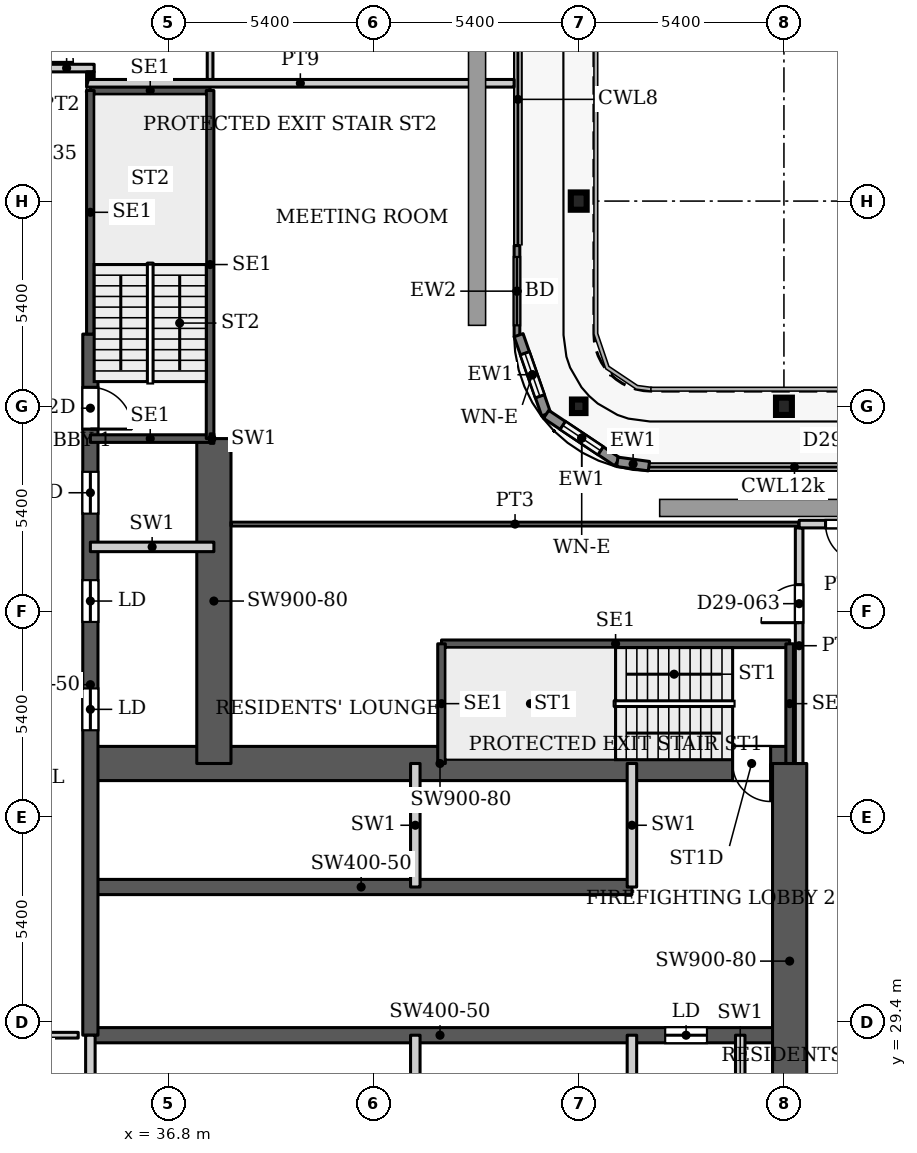
"""IFC4 building model, lengths in metres.
Left out: names, types, materials, properties, quantities, classifications, styles, units other than length and angle.
Written with IfcOpenShell. Run it as: python <this file> out.ifc"""

import sys

from ifc_helpers import new_model, si_unit, direction, frame, frame_2d, origin, origin_2d, place, context, subcontext, project, spatial, rectangle, hollow_rectangle, i_section, extrude, source, transform, mapped, element, fill, save


model = new_model("IFC4")
c1 = context("Model", 3, precision=1e-05, world=origin(), true_north=direction((0.0, 1.0)))
c2 = subcontext(c1, "Body", "Model", "MODEL_VIEW")
j1 = project(units=[si_unit("LENGTHUNIT", "METRE"), si_unit("PLANEANGLEUNIT", "RADIAN")], contexts=[c1])
p1 = place(None, origin())
s1 = spatial("IfcSite", under=j1, at=p1, CompositionType="ELEMENT")
p2 = place(p1, origin())
s2 = spatial("IfcBuilding", under=s1, at=p2, CompositionType="ELEMENT")
p3 = place(p2, frame((0.0, 0.0, 129.2)))
s3 = spatial("IfcBuildingStorey", under=s2, at=p3, CompositionType="ELEMENT", Elevation=129.2)
for number, where, z_axis, x_axis in (
    (1, (53.0, 45.6, 0.0), (0.0, 0.0, 1.0), (1.0, 0.0, 0.0)),
    (2, (47.6, 51.0, 0.0), (0.0, 0.0, 1.0), (1.0, 0.0, 0.0)),
):
    element("IfcColumn", number, at=place(p3, frame(where, z_axis=z_axis, x_axis=x_axis)), inside=s3, PredefinedType="COLUMN", context=c2, shape_type="SweptSolid", body=[
        extrude(i_section(OverallWidth=0.418, OverallDepth=0.455, WebThickness=0.042, FlangeThickness=0.068, FilletRadius=0.014, at=origin_2d()), origin(), (0.0, 0.0, 1.0), 3.9),
    ])
p4 = place(p3, frame((47.6, 45.6, 0.0), z_axis=(0.0, 0.0, 1.0), x_axis=(1.0, 0.0, 0.0)))
e3 = element("IfcColumn", 3, at=p4, inside=s3, PredefinedType="COLUMN", context=c2, shape_type="SweptSolid", body=[
    extrude(hollow_rectangle(XDim=0.356, YDim=0.356, WallThickness=0.016, InnerFilletRadius=0.016, OuterFilletRadius=0.032, at=origin_2d()), origin(), (0.0, 0.0, 1.0), 3.9),
])
p5 = place(p3, frame((34.75, 29.05, 0.0), z_axis=(0.0, 0.0, 1.0), x_axis=(1.0, 0.0, 0.0)))
e4 = element("IfcWall", 4, at=p5, inside=s3, PredefinedType="SHEAR", context=c2, shape_type="SweptSolid", body=[
    extrude(rectangle(XDim=18.4, YDim=0.4, at=frame_2d((9.2, 0.0))), origin(), (0.0, 0.0, 1.0), 3.9),
])
p6 = place(p5, frame((15.125, 0.0, 0.0)))
e5 = element("IfcOpeningElement", 5, at=p6, cuts=e4, PredefinedType="OPENING", context=c2, shape_type="SweptSolid", body=[
    extrude(rectangle(XDim=1.1, YDim=2.2, at=frame_2d((0.55, 1.1))), frame((0.0, 0.21, 0.0), z_axis=(0.0, -1.0, 0.0), x_axis=(1.0, 0.0, 0.0)), (0.0, 0.0, 1.0), 0.42),
])
p7 = place(p3, frame((34.75, 32.95, 0.0), z_axis=(0.0, 0.0, 1.0), x_axis=(1.0, 0.0, 0.0)))
e6 = element("IfcWall", 6, at=p7, inside=s3, PredefinedType="SHEAR", context=c2, shape_type="SweptSolid", body=[
    extrude(rectangle(XDim=14.25, YDim=0.4, at=frame_2d((7.125, 0.0))), origin(), (0.0, 0.0, 1.0), 3.9),
])
p8 = place(p3, frame((34.75, 36.2, 0.0), z_axis=(0.0, 0.0, 1.0), x_axis=(1.0, 0.0, 0.0)))
e7 = element("IfcWall", 7, at=p8, inside=s3, PredefinedType="SHEAR", context=c2, shape_type="SweptSolid", body=[
    extrude(rectangle(XDim=18.4, YDim=0.9, at=frame_2d((9.2, 0.0))), origin(), (0.0, 0.0, 1.0), 3.9),
])
p9 = place(p8, frame((16.9, 0.0, 0.0)))
e8 = element("IfcOpeningElement", 8, at=p9, cuts=e7, PredefinedType="OPENING", context=c2, shape_type="SweptSolid", body=[
    extrude(rectangle(XDim=1.0, YDim=2.2, at=frame_2d((0.5, 1.1))), frame((0.0, 0.46, 0.0), z_axis=(0.0, -1.0, 0.0), x_axis=(1.0, 0.0, 0.0)), (0.0, 0.0, 1.0), 0.92),
])
p10 = place(p3, frame((34.75, 29.05, 0.0), z_axis=(0.0, 0.0, 1.0), x_axis=(0.0, 1.0, 0.0)))
e9 = element("IfcWall", 9, at=p10, inside=s3, PredefinedType="SHEAR", context=c2, shape_type="SweptSolid", body=[
    extrude(rectangle(XDim=18.45, YDim=0.4, at=frame_2d((9.225, 0.0))), origin(), (0.0, 0.0, 1.0), 3.9),
])
p11 = place(p10, frame((8.025, 0.0, 0.0)))
e10 = element("IfcOpeningElement", 10, at=p11, cuts=e9, PredefinedType="OPENING", context=c2, shape_type="SweptSolid", body=[
    extrude(rectangle(XDim=1.1, YDim=2.2, at=frame_2d((0.55, 1.1))), frame((0.0, 0.21, 0.0), z_axis=(0.0, -1.0, 0.0), x_axis=(1.0, 0.0, 0.0)), (0.0, 0.0, 1.0), 0.42),
])
p12 = place(p10, frame((10.875, 0.0, 0.0)))
e11 = element("IfcOpeningElement", 11, at=p12, cuts=e9, PredefinedType="OPENING", context=c2, shape_type="SweptSolid", body=[
    extrude(rectangle(XDim=1.1, YDim=2.2, at=frame_2d((0.55, 1.1))), frame((0.0, 0.21, 0.0), z_axis=(0.0, -1.0, 0.0), x_axis=(1.0, 0.0, 0.0)), (0.0, 0.0, 1.0), 0.42),
])
p13 = place(p10, frame((13.725, 0.0, 0.0)))
e12 = element("IfcOpeningElement", 12, at=p13, cuts=e9, PredefinedType="OPENING", context=c2, shape_type="SweptSolid", body=[
    extrude(rectangle(XDim=1.1, YDim=2.2, at=frame_2d((0.55, 1.1))), frame((0.0, 0.21, 0.0), z_axis=(0.0, -1.0, 0.0), x_axis=(1.0, 0.0, 0.0)), (0.0, 0.0, 1.0), 0.42),
])
p14 = place(p10, frame((15.95, 0.0, 0.0)))
e13 = element("IfcOpeningElement", 13, at=p14, cuts=e9, PredefinedType="OPENING", context=c2, shape_type="SweptSolid", body=[
    extrude(rectangle(XDim=1.1, YDim=2.2, at=frame_2d((0.55, 1.1))), frame((0.0, 0.21, 0.0), z_axis=(0.0, -1.0, 0.0), x_axis=(1.0, 0.0, 0.0)), (0.0, 0.0, 1.0), 0.42),
])
p15 = place(p3, frame((38.0, 36.2, 0.0), z_axis=(0.0, 0.0, 1.0), x_axis=(0.0, 1.0, 0.0)))
e14 = element("IfcWall", 14, at=p15, inside=s3, PredefinedType="SHEAR", context=c2, shape_type="SweptSolid", body=[
    extrude(rectangle(XDim=8.55, YDim=0.9, at=frame_2d((4.275, 0.0))), origin(), (0.0, 0.0, 1.0), 3.9),
])
p16 = place(p3, frame((53.15, 25.8, 0.0), z_axis=(0.0, 0.0, 1.0), x_axis=(0.0, 1.0, 0.0)))
e15 = element("IfcWall", 15, at=p16, inside=s3, PredefinedType="SHEAR", context=c2, shape_type="SweptSolid", body=[
    extrude(rectangle(XDim=10.4, YDim=0.9, at=frame_2d((5.2, 0.0))), origin(), (0.0, 0.0, 1.0), 3.9),
])
p17 = place(p3, frame((45.975, 49.83, 0.0), z_axis=(0.0, 0.0, 1.0), x_axis=(0.0, -1.0, 0.0)))
e16 = element("IfcWall", 16, at=p17, inside=s3, PredefinedType="SOLIDWALL", context=c2, shape_type="SweptSolid", body=[
    extrude(rectangle(XDim=2.4, YDim=0.15, at=frame_2d((1.2, 0.0))), origin(), (0.0, 0.0, 1.0), 3.75),
])
p18 = place(p17, frame((0.3, 0.0, 0.0)))
e17 = element("IfcOpeningElement", 17, at=p18, cuts=e16, PredefinedType="OPENING", context=c2, shape_type="SweptSolid", body=[
    extrude(rectangle(XDim=1.8, YDim=2.4, at=frame_2d((0.9, 1.2))), frame((0.0, 0.085, 0.0), z_axis=(0.0, -1.0, 0.0), x_axis=(1.0, 0.0, 0.0)), (0.0, 0.0, 1.0), 0.17),
])
p19 = place(p3, frame((46.018, 47.471, 0.0), z_axis=(0.0, 0.0, 1.0), x_axis=(0.328791208903, -0.944402637093, 0.0)))
e18 = element("IfcWall", 18, at=p19, inside=s3, PredefinedType="SOLIDWALL", context=c2, shape_type="SweptSolid", body=[
    extrude(rectangle(XDim=2.205, YDim=0.25, at=frame_2d((1.102, 0.0))), origin(), (0.0, 0.0, 1.0), 3.75),
])
p20 = place(p19, frame((0.503, 0.0, 0.6)))
e19 = element("IfcOpeningElement", 19, at=p20, cuts=e18, PredefinedType="OPENING", context=c2, shape_type="SweptSolid", body=[
    extrude(rectangle(XDim=1.2, YDim=2.1, at=frame_2d((0.6, 1.05))), frame((0.0, 0.135, 0.0), z_axis=(0.0, -1.0, 0.0), x_axis=(1.0, 0.0, 0.0)), (0.0, 0.0, 1.0), 0.27),
])
p21 = place(p3, frame((46.743, 45.389, 0.0), z_axis=(0.0, 0.0, 1.0), x_axis=(0.831449265529, -0.555600682912, 0.0)))
e20 = element("IfcWall", 20, at=p21, inside=s3, PredefinedType="SOLIDWALL", context=c2, shape_type="SweptSolid", body=[
    extrude(rectangle(XDim=2.251, YDim=0.25, at=frame_2d((1.126, 0.0))), origin(), (0.0, 0.0, 1.0), 3.75),
])
p22 = place(p21, frame((0.525, 0.0, 0.6)))
e21 = element("IfcOpeningElement", 21, at=p22, cuts=e20, PredefinedType="OPENING", context=c2, shape_type="SweptSolid", body=[
    extrude(rectangle(XDim=1.2, YDim=2.1, at=frame_2d((0.6, 1.05))), frame((0.0, 0.135, 0.0), z_axis=(0.0, -1.0, 0.0), x_axis=(1.0, 0.0, 0.0)), (0.0, 0.0, 1.0), 0.27),
])
p23 = place(p3, frame((48.615, 44.138, 0.0), z_axis=(0.0, 0.0, 1.0), x_axis=(0.990741504246, -0.135761819977, 0.0)))
e22 = element("IfcWall", 22, at=p23, inside=s3, PredefinedType="SOLIDWALL", context=c2, shape_type="SweptSolid", body=[
    extrude(rectangle(XDim=0.84, YDim=0.25, at=frame_2d((0.42, 0.0))), origin(), (0.0, 0.0, 1.0), 3.75),
])
p24 = place(p3, frame((43.99, 39.35, 0.0), z_axis=(0.0, 0.0, 1.0), x_axis=(1.0, 0.0, 0.0)))
e23 = element("IfcWall", 23, at=p24, inside=s3, PredefinedType="SHEAR", context=c2, shape_type="SweptSolid", body=[
    extrude(rectangle(XDim=9.16, YDim=0.2, at=frame_2d((4.58, 0.0))), origin(), (0.0, 0.0, 1.0), 3.9),
])
for number, where, z_axis, x_axis in (
    (24, (43.99, 36.2, 0.0), (0.0, 0.0, 1.0), (0.0, 1.0, 0.0)),
    (25, (53.15, 36.2, 0.0), (0.0, 0.0, 1.0), (0.0, 1.0, 0.0)),
):
    element("IfcWall", number, at=place(p3, frame(where, z_axis=z_axis, x_axis=x_axis)), inside=s3, PredefinedType="SHEAR", context=c2, shape_type="SweptSolid", body=[
        extrude(rectangle(XDim=3.15, YDim=0.2, at=frame_2d((1.575, 0.0))), origin(), (0.0, 0.0, 1.0), 3.9),
    ])
for number, where, z_axis, x_axis in (
    (26, (34.75, 44.75, 0.0), (0.0, 0.0, 1.0), (1.0, 0.0, 0.0)),
    (27, (34.75, 53.91, 0.0), (0.0, 0.0, 1.0), (1.0, 0.0, 0.0)),
):
    element("IfcWall", number, at=place(p3, frame(where, z_axis=z_axis, x_axis=x_axis)), inside=s3, PredefinedType="SHEAR", context=c2, shape_type="SweptSolid", body=[
        extrude(rectangle(XDim=3.15, YDim=0.2, at=frame_2d((1.575, 0.0))), origin(), (0.0, 0.0, 1.0), 3.9),
    ])
p25 = place(p3, frame((34.75, 47.5, 0.0), z_axis=(0.0, 0.0, 1.0), x_axis=(0.0, 1.0, 0.0)))
e28 = element("IfcWall", 28, at=p25, inside=s3, PredefinedType="SHEAR", context=c2, shape_type="SweptSolid", body=[
    extrude(rectangle(XDim=6.41, YDim=0.2, at=frame_2d((3.205, 0.0))), origin(), (0.0, 0.0, 1.0), 3.9),
])
p26 = place(p3, frame((37.9, 44.75, 0.0), z_axis=(0.0, 0.0, 1.0), x_axis=(0.0, 1.0, 0.0)))
e29 = element("IfcWall", 29, at=p26, inside=s3, PredefinedType="SHEAR", context=c2, shape_type="SweptSolid", body=[
    extrude(rectangle(XDim=9.16, YDim=0.2, at=frame_2d((4.58, 0.0))), origin(), (0.0, 0.0, 1.0), 3.9),
])
for number, where, z_axis, x_axis in (
    (30, (34.75, 25.8, 0.0), (0.0, 0.0, 1.0), (0.0, 1.0, 0.0)),
    (31, (43.3, 25.8, 0.0), (0.0, 0.0, 1.0), (0.0, 1.0, 0.0)),
    (32, (43.3, 32.95, 0.0), (0.0, 0.0, 1.0), (0.0, 1.0, 0.0)),
    (33, (49.0, 25.8, 0.0), (0.0, 0.0, 1.0), (0.0, 1.0, 0.0)),
    (34, (49.0, 32.95, 0.0), (0.0, 0.0, 1.0), (0.0, 1.0, 0.0)),
    (35, (51.85, 25.8, 0.0), (0.0, 0.0, 1.0), (0.0, 1.0, 0.0)),
    (36, (34.75, 41.9, 0.0), (0.0, 0.0, 1.0), (1.0, 0.0, 0.0)),
):
    element("IfcWall", number, at=place(p3, frame(where, z_axis=z_axis, x_axis=x_axis)), inside=s3, PredefinedType="PARTITIONING", context=c2, shape_type="SweptSolid", body=[
        extrude(rectangle(XDim=3.25, YDim=0.25, at=frame_2d((1.625, 0.0))), origin(), (0.0, 0.0, 1.0), 3.9),
    ])
p27 = place(p3, frame((37.9, 44.75, 0.0), z_axis=(0.0, 0.0, 1.0), x_axis=(1.0, 0.0, 0.0)))
e37 = element("IfcWall", 37, at=p27, inside=s3, PredefinedType="PARTITIONING", context=c2, shape_type="SweptSolid", body=[
    extrude(rectangle(XDim=0.1, YDim=0.25, at=frame_2d((0.05, 0.0))), origin(), (0.0, 0.0, 1.0), 3.9),
])
p28 = place(p3, frame((31.07, 29.05, 0.0), z_axis=(0.0, 0.0, 1.0), x_axis=(1.0, 0.0, 0.0)))
e38 = element("IfcWall", 38, at=p28, inside=s3, PredefinedType="PARTITIONING", context=c2, shape_type="SweptSolid", body=[
    extrude(rectangle(XDim=3.36, YDim=0.15, at=frame_2d((1.68, 0.0))), origin(), (0.0, 0.0, 1.0), 3.9),
])
p29 = place(p28, frame((1.105, 0.0, 0.0)))
e39 = element("IfcOpeningElement", 39, at=p29, cuts=e38, PredefinedType="OPENING", context=c2, shape_type="SweptSolid", body=[
    extrude(rectangle(XDim=0.9, YDim=2.2, at=frame_2d((0.45, 1.1))), frame((0.0, 0.085, 0.0), z_axis=(0.0, -1.0, 0.0), x_axis=(1.0, 0.0, 0.0)), (0.0, 0.0, 1.0), 0.17),
])
p30 = place(p3, frame((33.4, 54.5, 0.0), z_axis=(0.0, 0.0, 1.0), x_axis=(1.0, 0.0, 0.0)))
e40 = element("IfcWall", 40, at=p30, inside=s3, PredefinedType="PARTITIONING", context=c2, shape_type="SweptSolid", body=[
    extrude(rectangle(XDim=1.45, YDim=0.2, at=frame_2d((0.725, 0.0))), origin(), (0.0, 0.0, 1.0), 3.6),
])
p31 = place(p3, frame((34.65, 54.1, 0.0), z_axis=(0.0, 0.0, 1.0), x_axis=(1.0, 0.0, 0.0)))
e41 = element("IfcWall", 41, at=p31, inside=s3, PredefinedType="PARTITIONING", context=c2, shape_type="SweptSolid", body=[
    extrude(rectangle(XDim=11.25, YDim=0.2, at=frame_2d((5.625, 0.0))), origin(), (0.0, 0.0, 1.0), 3.6),
])
p32 = place(p3, frame((34.75, 54.2, 0.0), z_axis=(0.0, 0.0, 1.0), x_axis=(0.0, 1.0, 0.0)))
e42 = element("IfcWall", 42, at=p32, inside=s3, PredefinedType="PARTITIONING", context=c2, shape_type="SweptSolid", body=[
    extrude(rectangle(XDim=0.2, YDim=0.2, at=frame_2d((0.1, 0.0))), origin(), (0.0, 0.0, 1.0), 3.6),
])
p33 = place(p3, frame((37.9, 54.2, 0.0), z_axis=(0.0, 0.0, 1.0), x_axis=(0.0, 1.0, 0.0)))
e43 = element("IfcWall", 43, at=p33, inside=s3, PredefinedType="PARTITIONING", context=c2, shape_type="SweptSolid", body=[
    extrude(rectangle(XDim=9.4, YDim=0.15, at=frame_2d((4.7, 0.0))), origin(), (0.0, 0.0, 1.0), 3.6),
])
p34 = place(p33, frame((7.1, 0.0, 0.0)))
e44 = element("IfcOpeningElement", 44, at=p34, cuts=e43, PredefinedType="OPENING", context=c2, shape_type="SweptSolid", body=[
    extrude(rectangle(XDim=0.9, YDim=2.1, at=frame_2d((0.45, 1.05))), frame((0.0, 0.085, 0.0), z_axis=(0.0, -1.0, 0.0), x_axis=(1.0, 0.0, 0.0)), (0.0, 0.0, 1.0), 0.17),
])
p35 = place(p33, frame((2.25, 0.0, 0.0)))
e45 = element("IfcOpeningElement", 45, at=p35, cuts=e43, PredefinedType="OPENING", context=c2, shape_type="SweptSolid", body=[
    extrude(rectangle(XDim=1.0, YDim=2.1, at=frame_2d((0.5, 1.05))), frame((0.0, 0.085, 0.0), z_axis=(0.0, -1.0, 0.0), x_axis=(1.0, 0.0, 0.0)), (0.0, 0.0, 1.0), 0.17),
])
p36 = place(p3, frame((38.449, 42.5, 0.0), z_axis=(0.0, 0.0, 1.0), x_axis=(1.0, 0.0, 0.0)))
e46 = element("IfcWall", 46, at=p36, inside=s3, PredefinedType="PARTITIONING", context=c2, shape_type="SweptSolid", body=[
    extrude(rectangle(XDim=14.951, YDim=0.1, at=frame_2d((7.476, 0.0))), origin(), (0.0, 0.0, 1.0), 3.6),
])
p37 = place(p3, frame((53.4, 36.199, 0.0), z_axis=(0.0, 0.0, 1.0), x_axis=(0.0, 1.0, 0.0)))
e47 = element("IfcWall", 47, at=p37, inside=s3, PredefinedType="PARTITIONING", context=c2, shape_type="SweptSolid", body=[
    extrude(rectangle(XDim=6.201, YDim=0.2, at=frame_2d((3.101, 0.0))), origin(), (0.0, 0.0, 1.0), 3.6),
])
p38 = place(p37, frame((3.707, 0.0, 0.0)))
e48 = element("IfcOpeningElement", 48, at=p38, cuts=e47, PredefinedType="OPENING", context=c2, shape_type="SweptSolid", body=[
    extrude(rectangle(XDim=1.0, YDim=2.1, at=frame_2d((0.5, 1.05))), frame((0.0, 0.11, 0.0), z_axis=(0.0, -1.0, 0.0), x_axis=(1.0, 0.0, 0.0)), (0.0, 0.0, 1.0), 0.22),
])
p39 = place(p3, frame((53.4, 42.5, 0.0), z_axis=(0.0, 0.0, 1.0), x_axis=(1.0, 0.0, 0.0)))
e49 = element("IfcWall", 49, at=p39, inside=s3, PredefinedType="PARTITIONING", context=c2, shape_type="SweptSolid", body=[
    extrude(rectangle(XDim=2.3, YDim=0.2, at=frame_2d((1.15, 0.0))), origin(), (0.0, 0.0, 1.0), 3.6),
])
p40 = place(p39, frame((0.695, 0.0, 0.0)))
e50 = element("IfcOpeningElement", 50, at=p40, cuts=e49, PredefinedType="OPENING", context=c2, shape_type="SweptSolid", body=[
    extrude(rectangle(XDim=1.0, YDim=2.1, at=frame_2d((0.5, 1.05))), frame((0.0, 0.11, 0.0), z_axis=(0.0, -1.0, 0.0), x_axis=(1.0, 0.0, 0.0)), (0.0, 0.0, 1.0), 0.22),
])
m1 = source(origin(), c2, "Body", "SweptSolid", [
    extrude(rectangle(XDim=1.8, YDim=2.4, at=frame_2d((0.9, 1.2))), frame((0.0, 0.025, 0.0), z_axis=(0.0, -1.0, 0.0), x_axis=(1.0, 0.0, 0.0)), (0.0, 0.0, 1.0), 0.05),
])
p41 = place(p18, origin())
e51 = element("IfcDoor", 51, at=p41, inside=s3, OperationType="SLIDING_TO_LEFT", PredefinedType="DOOR", context=c2, shape_type="MappedRepresentation", body=[
    mapped(m1, transform((0.0, 0.0, 0.0), x_axis=(1.0, 0.0, 0.0), y_axis=(0.0, 1.0, 0.0), z_axis=(0.0, 0.0, 1.0), scale=1.0)),
])
fill(e17, e51)
m2 = source(origin(), c2, "Body", "SweptSolid", [
    extrude(rectangle(XDim=1.2, YDim=2.1, at=frame_2d((0.6, 1.05))), frame((0.0, 0.03, 0.0), z_axis=(0.0, -1.0, 0.0), x_axis=(1.0, 0.0, 0.0)), (0.0, 0.0, 1.0), 0.06),
])
p42 = place(p20, origin())
e52 = element("IfcWindow", 52, at=p42, inside=s3, PartitioningType="SINGLE_PANEL", PredefinedType="WINDOW", context=c2, shape_type="MappedRepresentation", body=[
    mapped(m2, transform((0.0, 0.0, 0.0), x_axis=(1.0, 0.0, 0.0), y_axis=(0.0, 1.0, 0.0), z_axis=(0.0, 0.0, 1.0), scale=1.0)),
])
fill(e19, e52)
p43 = place(p22, origin())
e53 = element("IfcWindow", 53, at=p43, inside=s3, PartitioningType="SINGLE_PANEL", PredefinedType="WINDOW", context=c2, shape_type="MappedRepresentation", body=[
    mapped(m2, transform((0.0, 0.0, 0.0), x_axis=(1.0, 0.0, 0.0), y_axis=(0.0, 1.0, 0.0), z_axis=(0.0, 0.0, 1.0), scale=1.0)),
])
fill(e21, e53)
m3 = source(origin(), c2, "Body", "SweptSolid", [
    extrude(rectangle(XDim=1.1, YDim=2.2, at=frame_2d((0.55, 1.1))), frame((0.0, 0.025, 0.0), z_axis=(0.0, -1.0, 0.0), x_axis=(1.0, 0.0, 0.0)), (0.0, 0.0, 1.0), 0.05),
])
p44 = place(p11, origin())
e54 = element("IfcDoor", 54, at=p44, inside=s3, OperationType="SLIDING_TO_LEFT", PredefinedType="DOOR", context=c2, shape_type="MappedRepresentation", body=[
    mapped(m3, transform((0.0, 0.0, 0.0), x_axis=(1.0, 0.0, 0.0), y_axis=(0.0, 1.0, 0.0), z_axis=(0.0, 0.0, 1.0), scale=1.0)),
])
fill(e10, e54)
p45 = place(p12, origin())
e55 = element("IfcDoor", 55, at=p45, inside=s3, OperationType="SLIDING_TO_LEFT", PredefinedType="DOOR", context=c2, shape_type="MappedRepresentation", body=[
    mapped(m3, transform((0.0, 0.0, 0.0), x_axis=(1.0, 0.0, 0.0), y_axis=(0.0, 1.0, 0.0), z_axis=(0.0, 0.0, 1.0), scale=1.0)),
])
fill(e11, e55)
p46 = place(p13, origin())
e56 = element("IfcDoor", 56, at=p46, inside=s3, OperationType="SLIDING_TO_LEFT", PredefinedType="DOOR", context=c2, shape_type="MappedRepresentation", body=[
    mapped(m3, transform((0.0, 0.0, 0.0), x_axis=(1.0, 0.0, 0.0), y_axis=(0.0, 1.0, 0.0), z_axis=(0.0, 0.0, 1.0), scale=1.0)),
])
fill(e12, e56)
p47 = place(p6, origin())
e57 = element("IfcDoor", 57, at=p47, inside=s3, OperationType="SLIDING_TO_LEFT", PredefinedType="DOOR", context=c2, shape_type="MappedRepresentation", body=[
    mapped(m3, transform((0.0, 0.0, 0.0), x_axis=(1.0, 0.0, 0.0), y_axis=(0.0, 1.0, 0.0), z_axis=(0.0, 0.0, 1.0), scale=1.0)),
])
fill(e5, e57)
m4 = source(origin(), c2, "Body", "SweptSolid", [
    extrude(rectangle(XDim=1.0, YDim=2.2, at=frame_2d((0.5, 1.1))), frame((0.0, 0.025, 0.0), z_axis=(0.0, -1.0, 0.0), x_axis=(1.0, 0.0, 0.0)), (0.0, 0.0, 1.0), 0.05),
])
p48 = place(p9, origin())
e58 = element("IfcDoor", 58, at=p48, inside=s3, OperationType="SINGLE_SWING_RIGHT", PredefinedType="DOOR", context=c2, shape_type="MappedRepresentation", body=[
    mapped(m4, transform((0.0, 0.0, 0.0), x_axis=(1.0, 0.0, 0.0), y_axis=(0.0, 1.0, 0.0), z_axis=(0.0, 0.0, 1.0), scale=1.0)),
])
fill(e8, e58)
m5 = source(origin(), c2, "Body", "SweptSolid", [
    extrude(rectangle(XDim=1.1, YDim=2.2, at=frame_2d((0.55, 1.1))), frame((0.0, 0.025, 0.0), z_axis=(0.0, -1.0, 0.0), x_axis=(1.0, 0.0, 0.0)), (0.0, 0.0, 1.0), 0.05),
])
p49 = place(p14, origin())
e59 = element("IfcDoor", 59, at=p49, inside=s3, OperationType="SINGLE_SWING_RIGHT", PredefinedType="DOOR", context=c2, shape_type="MappedRepresentation", body=[
    mapped(m5, transform((0.0, 0.0, 0.0), x_axis=(1.0, 0.0, 0.0), y_axis=(0.0, 1.0, 0.0), z_axis=(0.0, 0.0, 1.0), scale=1.0)),
])
fill(e13, e59)
m6 = source(origin(), c2, "Body", "SweptSolid", [
    extrude(rectangle(XDim=1.0, YDim=2.1, at=frame_2d((0.5, 1.05))), frame((0.0, 0.025, 0.0), z_axis=(0.0, -1.0, 0.0), x_axis=(1.0, 0.0, 0.0)), (0.0, 0.0, 1.0), 0.05),
])
p50 = place(p38, origin())
e60 = element("IfcDoor", 60, at=p50, inside=s3, OperationType="SINGLE_SWING_LEFT", PredefinedType="DOOR", context=c2, shape_type="MappedRepresentation", body=[
    mapped(m6, transform((0.0, 0.0, 0.0), x_axis=(1.0, 0.0, 0.0), y_axis=(0.0, 1.0, 0.0), z_axis=(0.0, 0.0, 1.0), scale=1.0)),
])
fill(e48, e60)
p51 = place(p40, origin())
e61 = element("IfcDoor", 61, at=p51, inside=s3, OperationType="SINGLE_SWING_RIGHT", PredefinedType="DOOR", context=c2, shape_type="MappedRepresentation", body=[
    mapped(m6, transform((0.0, 0.0, 0.0), x_axis=(1.0, 0.0, 0.0), y_axis=(0.0, 1.0, 0.0), z_axis=(0.0, 0.0, 1.0), scale=1.0)),
])
fill(e50, e61)
save(model, sys.argv[1])
